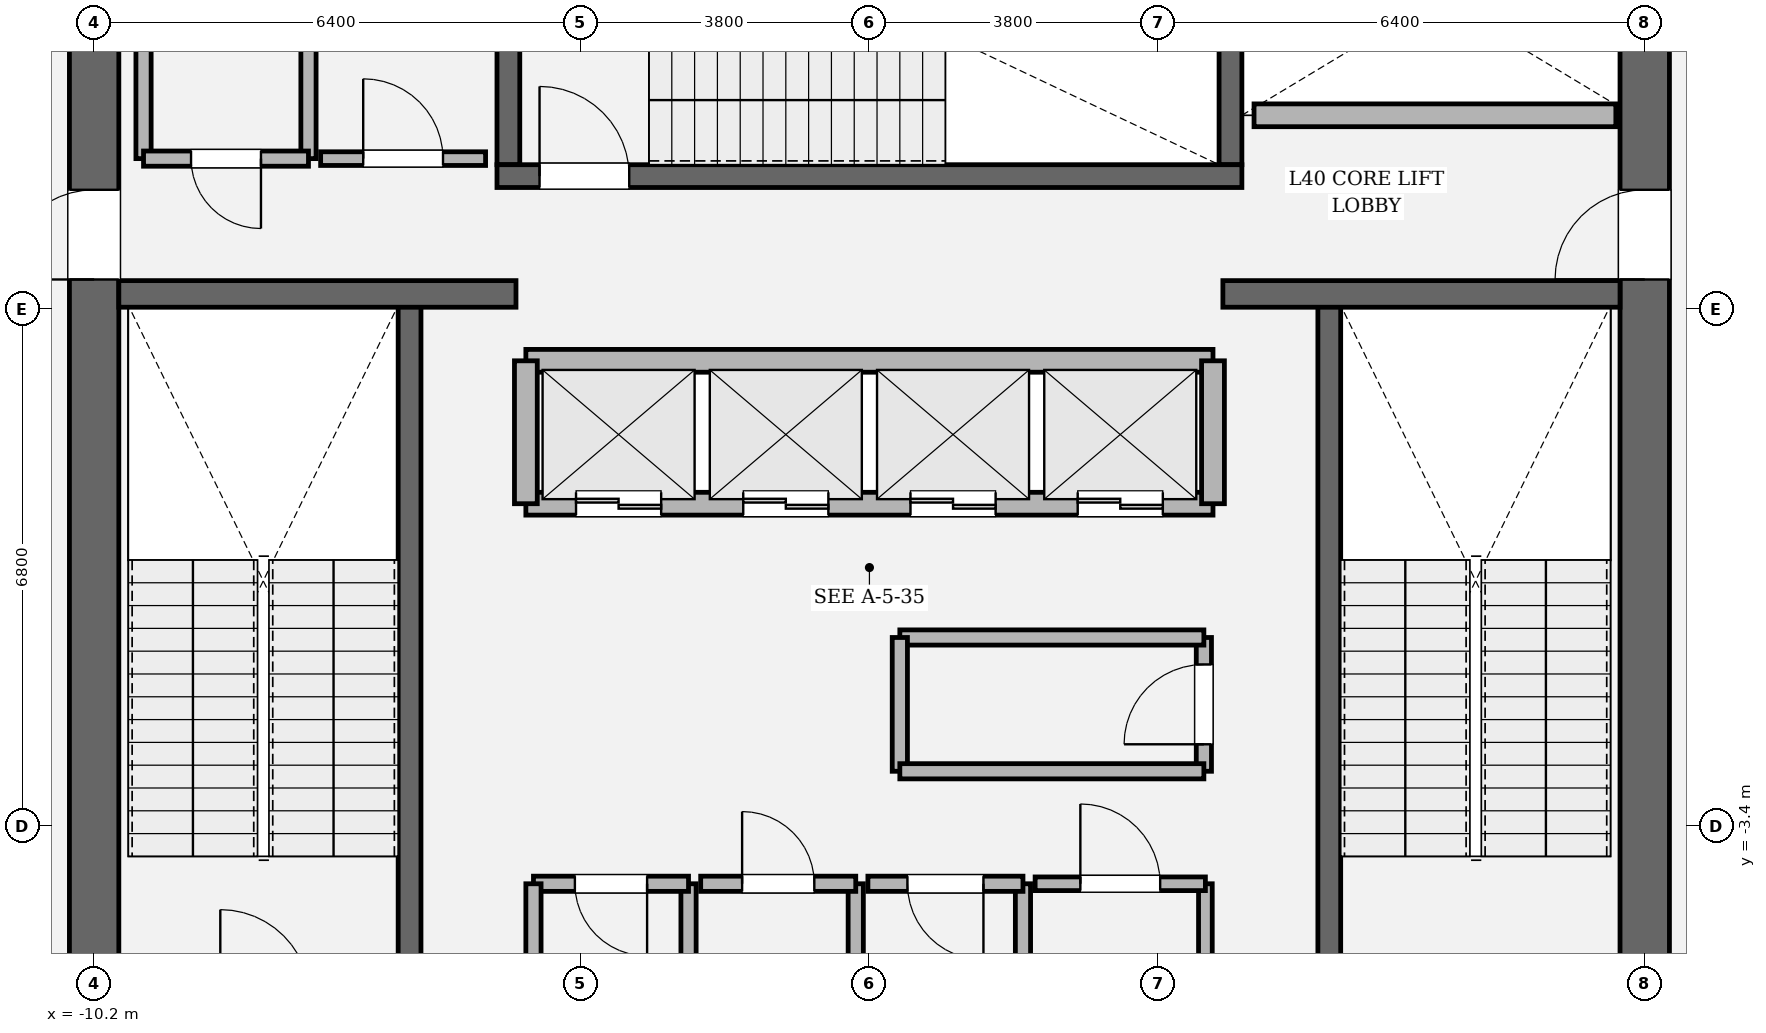
"""IFC4 building model, lengths in metres.
Left out: names, types, materials, properties, quantities, classifications, styles, units other than length and angle.
Written with IfcOpenShell. Run it as: python <this file> out.ifc"""

import sys

from ifc_helpers import new_model, si_unit, direction, frame, frame_2d, origin, place, context, subcontext, project, spatial, rectangle, extrude, element, fill, save


model = new_model("IFC4")
c1 = context("Model", 3, precision=1e-05, world=origin(), true_north=direction((0.0, 1.0)))
c2 = subcontext(c1, "Body", "Model", "MODEL_VIEW")
j1 = project(units=[si_unit("LENGTHUNIT", "METRE"), si_unit("PLANEANGLEUNIT", "RADIAN")], contexts=[c1])
p1 = place(None, origin())
s1 = spatial("IfcSite", under=j1, at=p1, CompositionType="ELEMENT")
p2 = place(p1, origin())
s2 = spatial("IfcBuilding", under=s1, at=p2, CompositionType="ELEMENT")
p3 = place(p2, frame((0.0, 0.0, 172.2)))
s3 = spatial("IfcBuildingStorey", under=s2, at=p3, CompositionType="ELEMENT", Elevation=172.2)
p4 = place(p3, frame((-10.2, -8.875, 0.0), z_axis=(0.0, 0.0, 1.0), x_axis=(0.0, 1.0, 0.0)))
e1 = element("IfcWall", 1, at=p4, inside=s3, PredefinedType="SHEAR", context=c2, shape_type="SweptSolid", body=[
    extrude(rectangle(XDim=17.75, YDim=0.65, at=frame_2d((8.875, 0.0))), origin(), (0.0, 0.0, 1.0), 4.05),
])
p5 = place(p4, frame((12.665, 0.0, 0.0)))
e2 = element("IfcOpeningElement", 2, at=p5, cuts=e1, PredefinedType="OPENING", context=c2, shape_type="SweptSolid", body=[
    extrude(rectangle(XDim=1.18, YDim=2.2, at=frame_2d((0.59, 1.1))), frame((0.0, 0.335, 0.0), z_axis=(0.0, -1.0, 0.0), x_axis=(1.0, 0.0, 0.0)), (0.0, 0.0, 1.0), 0.67),
])
p6 = place(p3, frame((10.2, 8.875, 0.0), z_axis=(0.0, 0.0, 1.0), x_axis=(0.0, -1.0, 0.0)))
e3 = element("IfcWall", 3, at=p6, inside=s3, PredefinedType="SHEAR", context=c2, shape_type="SweptSolid", body=[
    extrude(rectangle(XDim=17.75, YDim=0.65, at=frame_2d((8.875, 0.0))), origin(), (0.0, 0.0, 1.0), 4.05),
])
p7 = place(p6, frame((3.905, 0.0, 0.0)))
e4 = element("IfcOpeningElement", 4, at=p7, cuts=e3, PredefinedType="OPENING", context=c2, shape_type="SweptSolid", body=[
    extrude(rectangle(XDim=1.18, YDim=2.2, at=frame_2d((0.59, 1.1))), frame((0.0, 0.335, 0.0), z_axis=(0.0, -1.0, 0.0), x_axis=(1.0, 0.0, 0.0)), (0.0, 0.0, 1.0), 0.67),
])
for number, where, z_axis, x_axis in (
    (5, (-6.05, -5.5, 0.0), (0.0, 0.0, 1.0), (0.0, 1.0, 0.0)),
    (6, (6.05, 3.45, 0.0), (0.0, 0.0, 1.0), (0.0, -1.0, 0.0)),
):
    element("IfcWall", number, at=place(p3, frame(where, z_axis=z_axis, x_axis=x_axis)), inside=s3, PredefinedType="SOLIDWALL", context=c2, shape_type="SweptSolid", body=[
        extrude(rectangle(XDim=8.95, YDim=0.3, at=frame_2d((4.475, 0.0))), origin(), (0.0, 0.0, 1.0), 4.05),
    ])
for number, where, z_axis, x_axis in (
    (7, (-4.75, 5.3, 0.0), (0.0, 0.0, 1.0), (0.0, 1.0, 0.0)),
    (8, (4.75, 8.875, 0.0), (0.0, 0.0, 1.0), (0.0, -1.0, 0.0)),
):
    element("IfcWall", number, at=place(p3, frame(where, z_axis=z_axis, x_axis=x_axis)), inside=s3, PredefinedType="SOLIDWALL", context=c2, shape_type="SweptSolid", body=[
        extrude(rectangle(XDim=3.575, YDim=0.3, at=frame_2d((1.788, 0.0))), origin(), (0.0, 0.0, 1.0), 4.05),
    ])
p8 = place(p3, frame((-4.9, 5.15, 0.0), z_axis=(0.0, 0.0, 1.0), x_axis=(1.0, 0.0, 0.0)))
e9 = element("IfcWall", 9, at=p8, inside=s3, PredefinedType="SOLIDWALL", context=c2, shape_type="SweptSolid", body=[
    extrude(rectangle(XDim=9.8, YDim=0.3, at=frame_2d((4.9, 0.0))), origin(), (0.0, 0.0, 1.0), 4.05),
])
p9 = place(p8, frame((0.56, 0.0, 0.0)))
e10 = element("IfcOpeningElement", 10, at=p9, cuts=e9, PredefinedType="OPENING", context=c2, shape_type="SweptSolid", body=[
    extrude(rectangle(XDim=1.18, YDim=2.2, at=frame_2d((0.59, 1.1))), frame((0.0, 0.16, 0.0), z_axis=(0.0, -1.0, 0.0), x_axis=(1.0, 0.0, 0.0)), (0.0, 0.0, 1.0), 0.32),
])
for number, where, z_axis, x_axis in (
    (11, (-9.875, 3.6, 0.0), (0.0, 0.0, 1.0), (1.0, 0.0, 0.0)),
    (12, (4.65, 3.6, 0.0), (0.0, 0.0, 1.0), (1.0, 0.0, 0.0)),
):
    element("IfcWall", number, at=place(p3, frame(where, z_axis=z_axis, x_axis=x_axis)), inside=s3, PredefinedType="SOLIDWALL", context=c2, shape_type="SweptSolid", body=[
        extrude(rectangle(XDim=5.225, YDim=0.35, at=frame_2d((2.613, 0.0))), origin(), (0.0, 0.0, 1.0), 4.05),
    ])
p10 = place(p3, frame((-4.52, 0.84, 0.0), z_axis=(0.0, 0.0, 1.0), x_axis=(1.0, 0.0, 0.0)))
e13 = element("IfcWall", 13, at=p10, inside=s3, PredefinedType="SOLIDWALL", context=c2, shape_type="SweptSolid", body=[
    extrude(rectangle(XDim=9.04, YDim=0.3, at=frame_2d((4.52, 0.0))), origin(), (0.0, 0.0, 1.0), 3.83),
])
p11 = place(p10, frame((0.66, 0.0, 0.0)))
e14 = element("IfcOpeningElement", 14, at=p11, cuts=e13, PredefinedType="OPENING", context=c2, shape_type="SweptSolid", body=[
    extrude(rectangle(XDim=1.12, YDim=2.25, at=frame_2d((0.56, 1.125))), frame((0.0, 0.16, 0.0), z_axis=(0.0, -1.0, 0.0), x_axis=(1.0, 0.0, 0.0)), (0.0, 0.0, 1.0), 0.32),
])
p12 = place(p10, frame((2.86, 0.0, 0.0)))
e15 = element("IfcOpeningElement", 15, at=p12, cuts=e13, PredefinedType="OPENING", context=c2, shape_type="SweptSolid", body=[
    extrude(rectangle(XDim=1.12, YDim=2.25, at=frame_2d((0.56, 1.125))), frame((0.0, 0.16, 0.0), z_axis=(0.0, -1.0, 0.0), x_axis=(1.0, 0.0, 0.0)), (0.0, 0.0, 1.0), 0.32),
])
p13 = place(p10, frame((5.06, 0.0, 0.0)))
e16 = element("IfcOpeningElement", 16, at=p13, cuts=e13, PredefinedType="OPENING", context=c2, shape_type="SweptSolid", body=[
    extrude(rectangle(XDim=1.12, YDim=2.25, at=frame_2d((0.56, 1.125))), frame((0.0, 0.16, 0.0), z_axis=(0.0, -1.0, 0.0), x_axis=(1.0, 0.0, 0.0)), (0.0, 0.0, 1.0), 0.32),
])
p14 = place(p10, frame((7.26, 0.0, 0.0)))
e17 = element("IfcOpeningElement", 17, at=p14, cuts=e13, PredefinedType="OPENING", context=c2, shape_type="SweptSolid", body=[
    extrude(rectangle(XDim=1.12, YDim=2.25, at=frame_2d((0.56, 1.125))), frame((0.0, 0.16, 0.0), z_axis=(0.0, -1.0, 0.0), x_axis=(1.0, 0.0, 0.0)), (0.0, 0.0, 1.0), 0.32),
])
p15 = place(p3, frame((-4.52, 2.72, 0.0), z_axis=(0.0, 0.0, 1.0), x_axis=(1.0, 0.0, 0.0)))
e18 = element("IfcWall", 18, at=p15, inside=s3, PredefinedType="SOLIDWALL", context=c2, shape_type="SweptSolid", body=[
    extrude(rectangle(XDim=9.04, YDim=0.3, at=frame_2d((4.52, 0.0))), origin(), (0.0, 0.0, 1.0), 3.83),
])
for number, where, z_axis, x_axis in (
    (19, (-4.52, 0.84, 0.0), (0.0, 0.0, 1.0), (0.0, 1.0, 0.0)),
    (20, (4.52, 0.84, 0.0), (0.0, 0.0, 1.0), (0.0, 1.0, 0.0)),
):
    element("IfcWall", number, at=place(p3, frame(where, z_axis=z_axis, x_axis=x_axis)), inside=s3, PredefinedType="SOLIDWALL", context=c2, shape_type="SweptSolid", body=[
        extrude(rectangle(XDim=1.88, YDim=0.3, at=frame_2d((0.94, 0.0))), origin(), (0.0, 0.0, 1.0), 3.83),
    ])
p16 = place(p3, frame((5.06, 5.95, 0.0), z_axis=(0.0, 0.0, 1.0), x_axis=(1.0, 0.0, 0.0)))
e21 = element("IfcWall", 21, at=p16, inside=s3, PredefinedType="SOLIDWALL", context=c2, shape_type="SweptSolid", body=[
    extrude(rectangle(XDim=4.76, YDim=0.3, at=frame_2d((2.38, 0.0))), origin(), (0.0, 0.0, 1.0), 3.83),
])
p17 = place(p3, frame((-2.38, -5.9, 0.0), z_axis=(0.0, 0.0, 1.0), x_axis=(0.0, 1.0, 0.0)))
e22 = element("IfcWall", 22, at=p17, inside=s3, PredefinedType="SOLIDWALL", context=c2, shape_type="SweptSolid", body=[
    extrude(rectangle(XDim=1.74, YDim=0.2, at=frame_2d((0.87, 0.0))), origin(), (0.0, 0.0, 1.0), 3.83),
])
p18 = place(p3, frame((-2.38, -4.16, 0.0), z_axis=(0.0, 0.0, 1.0), x_axis=(-1.0, 0.0, 0.0)))
e23 = element("IfcWall", 23, at=p18, inside=s3, PredefinedType="SOLIDWALL", context=c2, shape_type="SweptSolid", body=[
    extrude(rectangle(XDim=2.04, YDim=0.2, at=frame_2d((1.02, 0.0))), origin(), (0.0, 0.0, 1.0), 3.83),
])
p19 = place(p18, frame((0.545, 0.0, 0.0)))
e24 = element("IfcOpeningElement", 24, at=p19, cuts=e23, PredefinedType="OPENING", context=c2, shape_type="SweptSolid", body=[
    extrude(rectangle(XDim=0.95, YDim=2.15, at=frame_2d((0.475, 1.075))), frame((0.0, 0.11, 0.0), z_axis=(0.0, -1.0, 0.0), x_axis=(1.0, 0.0, 0.0)), (0.0, 0.0, 1.0), 0.22),
])
for number, where, z_axis, x_axis in (
    (25, (-4.42, -4.16, 0.0), (0.0, 0.0, 1.0), (0.0, -1.0, 0.0)),
    (26, (-0.18, -5.9, 0.0), (0.0, 0.0, 1.0), (0.0, 1.0, 0.0)),
):
    element("IfcWall", number, at=place(p3, frame(where, z_axis=z_axis, x_axis=x_axis)), inside=s3, PredefinedType="SOLIDWALL", context=c2, shape_type="SweptSolid", body=[
        extrude(rectangle(XDim=1.74, YDim=0.2, at=frame_2d((0.87, 0.0))), origin(), (0.0, 0.0, 1.0), 3.83),
    ])
p20 = place(p3, frame((-0.18, -4.16, 0.0), z_axis=(0.0, 0.0, 1.0), x_axis=(-1.0, 0.0, 0.0)))
e27 = element("IfcWall", 27, at=p20, inside=s3, PredefinedType="SOLIDWALL", context=c2, shape_type="SweptSolid", body=[
    extrude(rectangle(XDim=2.04, YDim=0.2, at=frame_2d((1.02, 0.0))), origin(), (0.0, 0.0, 1.0), 3.83),
])
p21 = place(p20, frame((0.545, 0.0, 0.0)))
e28 = element("IfcOpeningElement", 28, at=p21, cuts=e27, PredefinedType="OPENING", context=c2, shape_type="SweptSolid", body=[
    extrude(rectangle(XDim=0.95, YDim=2.15, at=frame_2d((0.475, 1.075))), frame((0.0, 0.11, 0.0), z_axis=(0.0, -1.0, 0.0), x_axis=(1.0, 0.0, 0.0)), (0.0, 0.0, 1.0), 0.22),
])
p22 = place(p3, frame((2.02, -5.9, 0.0), z_axis=(0.0, 0.0, 1.0), x_axis=(0.0, 1.0, 0.0)))
e29 = element("IfcWall", 29, at=p22, inside=s3, PredefinedType="SOLIDWALL", context=c2, shape_type="SweptSolid", body=[
    extrude(rectangle(XDim=1.74, YDim=0.2, at=frame_2d((0.87, 0.0))), origin(), (0.0, 0.0, 1.0), 3.83),
])
p23 = place(p3, frame((2.02, -4.16, 0.0), z_axis=(0.0, 0.0, 1.0), x_axis=(-1.0, 0.0, 0.0)))
e30 = element("IfcWall", 30, at=p23, inside=s3, PredefinedType="SOLIDWALL", context=c2, shape_type="SweptSolid", body=[
    extrude(rectangle(XDim=2.04, YDim=0.2, at=frame_2d((1.02, 0.0))), origin(), (0.0, 0.0, 1.0), 3.83),
])
p24 = place(p23, frame((0.52, 0.0, 0.0)))
e31 = element("IfcOpeningElement", 31, at=p24, cuts=e30, PredefinedType="OPENING", context=c2, shape_type="SweptSolid", body=[
    extrude(rectangle(XDim=1.0, YDim=2.15, at=frame_2d((0.5, 1.075))), frame((0.0, 0.11, 0.0), z_axis=(0.0, -1.0, 0.0), x_axis=(1.0, 0.0, 0.0)), (0.0, 0.0, 1.0), 0.22),
])
p25 = place(p3, frame((4.42, -5.9, 0.0), z_axis=(0.0, 0.0, 1.0), x_axis=(0.0, 1.0, 0.0)))
e32 = element("IfcWall", 32, at=p25, inside=s3, PredefinedType="PARTITIONING", context=c2, shape_type="SweptSolid", body=[
    extrude(rectangle(XDim=1.74, YDim=0.18, at=frame_2d((0.87, 0.0))), origin(), (0.0, 0.0, 1.0), 3.83),
])
p26 = place(p3, frame((4.42, -4.16, 0.0), z_axis=(0.0, 0.0, 1.0), x_axis=(-1.0, 0.0, 0.0)))
e33 = element("IfcWall", 33, at=p26, inside=s3, PredefinedType="PARTITIONING", context=c2, shape_type="SweptSolid", body=[
    extrude(rectangle(XDim=2.24, YDim=0.18, at=frame_2d((1.12, 0.0))), origin(), (0.0, 0.0, 1.0), 3.83),
])
p27 = place(p26, frame((0.595, 0.0, 0.0)))
e34 = element("IfcOpeningElement", 34, at=p27, cuts=e33, PredefinedType="OPENING", context=c2, shape_type="SweptSolid", body=[
    extrude(rectangle(XDim=1.05, YDim=2.2, at=frame_2d((0.525, 1.1))), frame((0.0, 0.1, 0.0), z_axis=(0.0, -1.0, 0.0), x_axis=(1.0, 0.0, 0.0)), (0.0, 0.0, 1.0), 0.2),
])
p28 = place(p3, frame((4.4, -2.68, 0.0), z_axis=(0.0, 0.0, 1.0), x_axis=(0.0, 1.0, 0.0)))
e35 = element("IfcWall", 35, at=p28, inside=s3, PredefinedType="SOLIDWALL", context=c2, shape_type="SweptSolid", body=[
    extrude(rectangle(XDim=1.76, YDim=0.2, at=frame_2d((0.88, 0.0))), origin(), (0.0, 0.0, 1.0), 3.83),
])
p29 = place(p28, frame((0.355, 0.0, 0.0)))
e36 = element("IfcOpeningElement", 36, at=p29, cuts=e35, PredefinedType="OPENING", context=c2, shape_type="SweptSolid", body=[
    extrude(rectangle(XDim=1.05, YDim=2.2, at=frame_2d((0.525, 1.1))), frame((0.0, 0.11, 0.0), z_axis=(0.0, -1.0, 0.0), x_axis=(1.0, 0.0, 0.0)), (0.0, 0.0, 1.0), 0.22),
])
p30 = place(p3, frame((4.4, -0.92, 0.0), z_axis=(0.0, 0.0, 1.0), x_axis=(-1.0, 0.0, 0.0)))
e37 = element("IfcWall", 37, at=p30, inside=s3, PredefinedType="SOLIDWALL", context=c2, shape_type="SweptSolid", body=[
    extrude(rectangle(XDim=4.0, YDim=0.2, at=frame_2d((2.0, 0.0))), origin(), (0.0, 0.0, 1.0), 3.83),
])
p31 = place(p3, frame((0.4, -0.92, 0.0), z_axis=(0.0, 0.0, 1.0), x_axis=(0.0, -1.0, 0.0)))
e38 = element("IfcWall", 38, at=p31, inside=s3, PredefinedType="SOLIDWALL", context=c2, shape_type="SweptSolid", body=[
    extrude(rectangle(XDim=1.76, YDim=0.2, at=frame_2d((0.88, 0.0))), origin(), (0.0, 0.0, 1.0), 3.83),
])
p32 = place(p3, frame((0.4, -2.68, 0.0), z_axis=(0.0, 0.0, 1.0), x_axis=(1.0, 0.0, 0.0)))
e39 = element("IfcWall", 39, at=p32, inside=s3, PredefinedType="SOLIDWALL", context=c2, shape_type="SweptSolid", body=[
    extrude(rectangle(XDim=4.0, YDim=0.2, at=frame_2d((2.0, 0.0))), origin(), (0.0, 0.0, 1.0), 3.83),
])
for number, where, z_axis, x_axis in (
    (40, (-7.38, 5.38, 0.0), (0.0, 0.0, 1.0), (0.0, 1.0, 0.0)),
    (41, (-9.55, 8.65, 0.0), (0.0, 0.0, 1.0), (0.0, -1.0, 0.0)),
):
    element("IfcWall", number, at=place(p3, frame(where, z_axis=z_axis, x_axis=x_axis)), inside=s3, PredefinedType="SOLIDWALL", context=c2, shape_type="SweptSolid", body=[
        extrude(rectangle(XDim=3.27, YDim=0.2, at=frame_2d((1.635, 0.0))), origin(), (0.0, 0.0, 1.0), 3.83),
    ])
p33 = place(p3, frame((-9.55, 5.38, 0.0), z_axis=(0.0, 0.0, 1.0), x_axis=(1.0, 0.0, 0.0)))
e42 = element("IfcWall", 42, at=p33, inside=s3, PredefinedType="SOLIDWALL", context=c2, shape_type="SweptSolid", body=[
    extrude(rectangle(XDim=2.17, YDim=0.2, at=frame_2d((1.085, 0.0))), origin(), (0.0, 0.0, 1.0), 3.83),
])
p34 = place(p33, frame((0.625, 0.0, 0.0)))
e43 = element("IfcOpeningElement", 43, at=p34, cuts=e42, PredefinedType="OPENING", context=c2, shape_type="SweptSolid", body=[
    extrude(rectangle(XDim=0.92, YDim=2.1, at=frame_2d((0.46, 1.05))), frame((0.0, 0.11, 0.0), z_axis=(0.0, -1.0, 0.0), x_axis=(1.0, 0.0, 0.0)), (0.0, 0.0, 1.0), 0.22),
])
p35 = place(p3, frame((-7.22, 5.38, 0.0), z_axis=(0.0, 0.0, 1.0), x_axis=(1.0, 0.0, 0.0)))
e44 = element("IfcWall", 44, at=p35, inside=s3, PredefinedType="PARTITIONING", context=c2, shape_type="SweptSolid", body=[
    extrude(rectangle(XDim=2.17, YDim=0.18, at=frame_2d((1.085, 0.0))), origin(), (0.0, 0.0, 1.0), 3.83),
])
p36 = place(p35, frame((0.56, 0.0, 0.0)))
e45 = element("IfcOpeningElement", 45, at=p36, cuts=e44, PredefinedType="OPENING", context=c2, shape_type="SweptSolid", body=[
    extrude(rectangle(XDim=1.05, YDim=2.2, at=frame_2d((0.525, 1.1))), frame((0.0, 0.1, 0.0), z_axis=(0.0, -1.0, 0.0), x_axis=(1.0, 0.0, 0.0)), (0.0, 0.0, 1.0), 0.2),
])
p37 = place(p9, origin())
e46 = element("IfcDoor", 46, at=p37, inside=s3, OperationType="SINGLE_SWING_LEFT", PredefinedType="DOOR", context=c2, shape_type="SweptSolid", body=[
    extrude(rectangle(XDim=1.18, YDim=2.2, at=frame_2d((0.59, 1.1))), frame((0.0, 0.025, 0.0), z_axis=(0.0, -1.0, 0.0), x_axis=(1.0, 0.0, 0.0)), (0.0, 0.0, 1.0), 0.05),
])
fill(e10, e46)
p38 = place(p5, origin())
e47 = element("IfcDoor", 47, at=p38, inside=s3, OperationType="SINGLE_SWING_LEFT", PredefinedType="DOOR", context=c2, shape_type="SweptSolid", body=[
    extrude(rectangle(XDim=1.18, YDim=2.2, at=frame_2d((0.59, 1.1))), frame((0.0, 0.025, 0.0), z_axis=(0.0, -1.0, 0.0), x_axis=(1.0, 0.0, 0.0)), (0.0, 0.0, 1.0), 0.05),
])
fill(e2, e47)
p39 = place(p7, origin())
e48 = element("IfcDoor", 48, at=p39, inside=s3, OperationType="SINGLE_SWING_RIGHT", PredefinedType="DOOR", context=c2, shape_type="SweptSolid", body=[
    extrude(rectangle(XDim=1.18, YDim=2.2, at=frame_2d((0.59, 1.1))), frame((0.0, 0.025, 0.0), z_axis=(0.0, -1.0, 0.0), x_axis=(1.0, 0.0, 0.0)), (0.0, 0.0, 1.0), 0.05),
])
fill(e4, e48)
p40 = place(p11, origin())
e49 = element("IfcDoor", 49, at=p40, inside=s3, OperationType="DOUBLE_DOOR_SLIDING", PredefinedType="DOOR", context=c2, shape_type="SweptSolid", body=[
    extrude(rectangle(XDim=1.12, YDim=2.25, at=frame_2d((0.56, 1.125))), frame((0.0, 0.025, 0.0), z_axis=(0.0, -1.0, 0.0), x_axis=(1.0, 0.0, 0.0)), (0.0, 0.0, 1.0), 0.05),
])
fill(e14, e49)
p41 = place(p12, origin())
e50 = element("IfcDoor", 50, at=p41, inside=s3, OperationType="DOUBLE_DOOR_SLIDING", PredefinedType="DOOR", context=c2, shape_type="SweptSolid", body=[
    extrude(rectangle(XDim=1.12, YDim=2.25, at=frame_2d((0.56, 1.125))), frame((0.0, 0.025, 0.0), z_axis=(0.0, -1.0, 0.0), x_axis=(1.0, 0.0, 0.0)), (0.0, 0.0, 1.0), 0.05),
])
fill(e15, e50)
p42 = place(p13, origin())
e51 = element("IfcDoor", 51, at=p42, inside=s3, OperationType="DOUBLE_DOOR_SLIDING", PredefinedType="DOOR", context=c2, shape_type="SweptSolid", body=[
    extrude(rectangle(XDim=1.12, YDim=2.25, at=frame_2d((0.56, 1.125))), frame((0.0, 0.025, 0.0), z_axis=(0.0, -1.0, 0.0), x_axis=(1.0, 0.0, 0.0)), (0.0, 0.0, 1.0), 0.05),
])
fill(e16, e51)
p43 = place(p14, origin())
e52 = element("IfcDoor", 52, at=p43, inside=s3, OperationType="DOUBLE_DOOR_SLIDING", PredefinedType="DOOR", context=c2, shape_type="SweptSolid", body=[
    extrude(rectangle(XDim=1.12, YDim=2.25, at=frame_2d((0.56, 1.125))), frame((0.0, 0.025, 0.0), z_axis=(0.0, -1.0, 0.0), x_axis=(1.0, 0.0, 0.0)), (0.0, 0.0, 1.0), 0.05),
])
fill(e17, e52)
p44 = place(p19, origin())
e53 = element("IfcDoor", 53, at=p44, inside=s3, OperationType="SINGLE_SWING_LEFT", PredefinedType="DOOR", context=c2, shape_type="SweptSolid", body=[
    extrude(rectangle(XDim=0.95, YDim=2.15, at=frame_2d((0.475, 1.075))), frame((0.0, 0.025, 0.0), z_axis=(0.0, -1.0, 0.0), x_axis=(1.0, 0.0, 0.0)), (0.0, 0.0, 1.0), 0.05),
])
fill(e24, e53)
p45 = place(p21, origin())
e54 = element("IfcDoor", 54, at=p45, inside=s3, OperationType="SINGLE_SWING_RIGHT", PredefinedType="DOOR", context=c2, shape_type="SweptSolid", body=[
    extrude(rectangle(XDim=0.95, YDim=2.15, at=frame_2d((0.475, 1.075))), frame((0.0, 0.025, 0.0), z_axis=(0.0, -1.0, 0.0), x_axis=(1.0, 0.0, 0.0)), (0.0, 0.0, 1.0), 0.05),
])
fill(e28, e54)
p46 = place(p24, origin())
e55 = element("IfcDoor", 55, at=p46, inside=s3, OperationType="SINGLE_SWING_LEFT", PredefinedType="DOOR", context=c2, shape_type="SweptSolid", body=[
    extrude(rectangle(XDim=1.0, YDim=2.15, at=frame_2d((0.5, 1.075))), frame((0.0, 0.025, 0.0), z_axis=(0.0, -1.0, 0.0), x_axis=(1.0, 0.0, 0.0)), (0.0, 0.0, 1.0), 0.05),
])
fill(e31, e55)
p47 = place(p27, origin())
e56 = element("IfcDoor", 56, at=p47, inside=s3, OperationType="SINGLE_SWING_RIGHT", PredefinedType="DOOR", context=c2, shape_type="SweptSolid", body=[
    extrude(rectangle(XDim=1.05, YDim=2.2, at=frame_2d((0.525, 1.1))), frame((0.0, 0.025, 0.0), z_axis=(0.0, -1.0, 0.0), x_axis=(1.0, 0.0, 0.0)), (0.0, 0.0, 1.0), 0.05),
])
fill(e34, e56)
p48 = place(p29, origin())
e57 = element("IfcDoor", 57, at=p48, inside=s3, OperationType="SINGLE_SWING_LEFT", PredefinedType="DOOR", context=c2, shape_type="SweptSolid", body=[
    extrude(rectangle(XDim=1.05, YDim=2.2, at=frame_2d((0.525, 1.1))), frame((0.0, 0.025, 0.0), z_axis=(0.0, -1.0, 0.0), x_axis=(1.0, 0.0, 0.0)), (0.0, 0.0, 1.0), 0.05),
])
fill(e36, e57)
p49 = place(p34, origin())
e58 = element("IfcDoor", 58, at=p49, inside=s3, OperationType="SINGLE_SWING_RIGHT", PredefinedType="DOOR", context=c2, shape_type="SweptSolid", body=[
    extrude(rectangle(XDim=0.92, YDim=2.1, at=frame_2d((0.46, 1.05))), frame((0.0, 0.025, 0.0), z_axis=(0.0, -1.0, 0.0), x_axis=(1.0, 0.0, 0.0)), (0.0, 0.0, 1.0), 0.05),
])
fill(e43, e58)
p50 = place(p36, origin())
e59 = element("IfcDoor", 59, at=p50, inside=s3, OperationType="SINGLE_SWING_LEFT", PredefinedType="DOOR", context=c2, shape_type="SweptSolid", body=[
    extrude(rectangle(XDim=1.05, YDim=2.2, at=frame_2d((0.525, 1.1))), frame((0.0, 0.025, 0.0), z_axis=(0.0, -1.0, 0.0), x_axis=(1.0, 0.0, 0.0)), (0.0, 0.0, 1.0), 0.05),
])
fill(e45, e59)
save(model, sys.argv[1])
